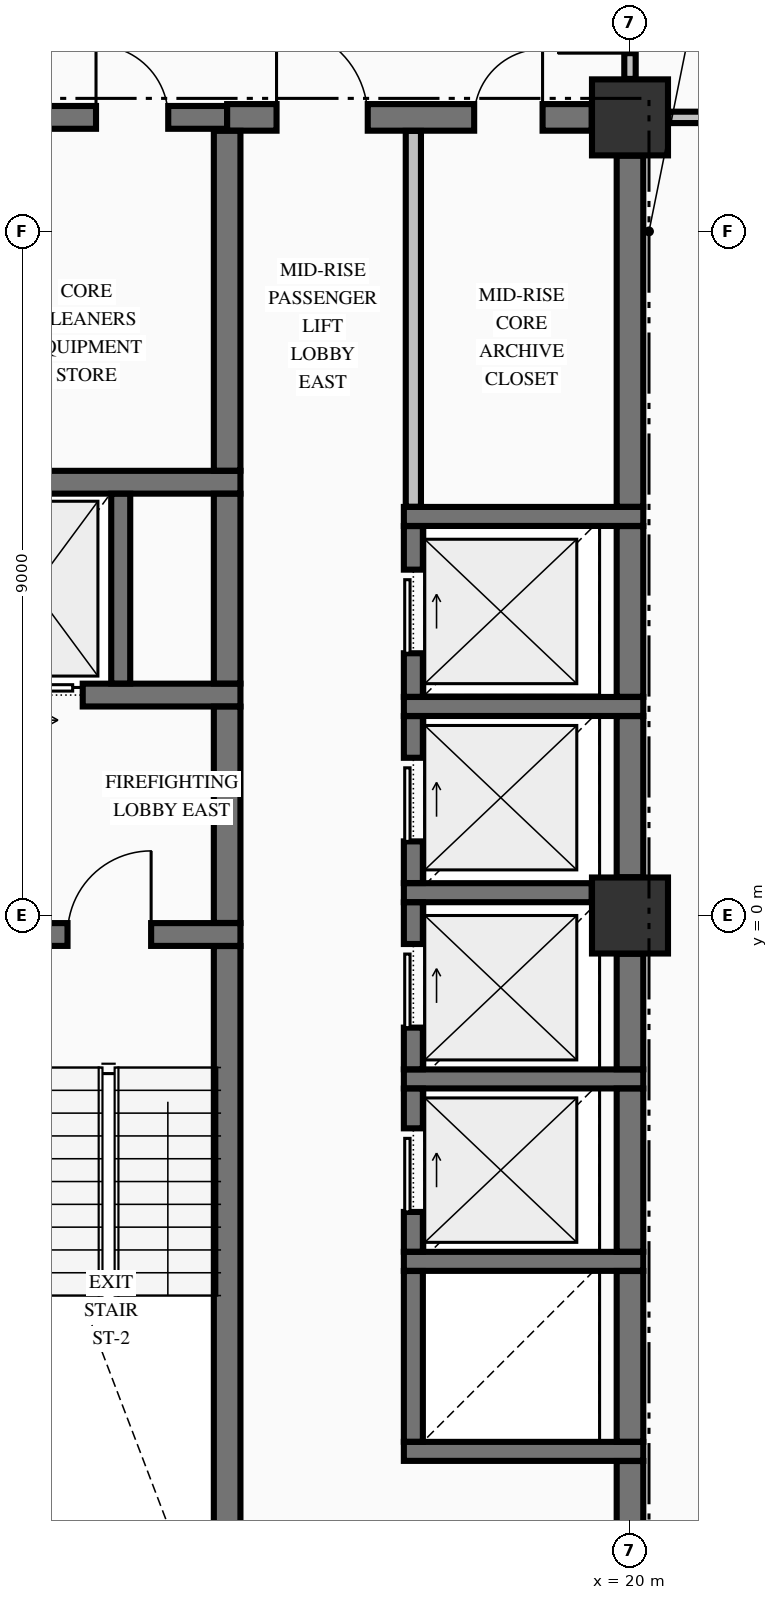
"""IFC4 building model, lengths in metres.
Left out: names, types, materials, properties, quantities, classifications, styles, units other than length and angle.
Written with IfcOpenShell. Run it as: python <this file> out.ifc"""

import sys

from ifc_helpers import new_model, si_unit, direction, frame, frame_2d, origin, origin_2d, place, context, subcontext, project, spatial, rectangle, extrude, element, fill, save


model = new_model("IFC4")
c1 = context("Model", 3, precision=1e-05, world=origin(), true_north=direction((0.0, 1.0)))
c2 = subcontext(c1, "Body", "Model", "MODEL_VIEW")
j1 = project(units=[si_unit("LENGTHUNIT", "METRE"), si_unit("PLANEANGLEUNIT", "RADIAN")], contexts=[c1])
p1 = place(None, origin())
s1 = spatial("IfcSite", under=j1, at=p1, CompositionType="ELEMENT")
p2 = place(p1, origin())
s2 = spatial("IfcBuilding", under=s1, at=p2, CompositionType="ELEMENT")
p3 = place(p2, frame((0.0, 0.0, 105.64)))
s3 = spatial("IfcBuildingStorey", under=s2, at=p3, CompositionType="ELEMENT", Elevation=105.64)
for number, where, z_axis, x_axis in (
    (1, (20.0, 10.5, -0.25), (0.0, 0.0, 1.0), (1.0, 0.0, 0.0)),
    (2, (20.0, 0.0, -0.25), (0.0, 0.0, 1.0), (1.0, 0.0, 0.0)),
):
    element("IfcColumn", number, at=place(p3, frame(where, z_axis=z_axis, x_axis=x_axis)), inside=s3, PredefinedType="COLUMN", context=c2, shape_type="SweptSolid", body=[
        extrude(rectangle(XDim=1.0, YDim=1.0, at=origin_2d()), origin(), (0.0, 0.0, 1.0), 3.57),
    ])
for number, where, z_axis, x_axis in (
    (3, (17.025, -7.05, 0.0), (0.0, 0.0, 1.0), (1.0, 0.0, 0.0)),
    (4, (17.025, -4.55, 0.0), (0.0, 0.0, 1.0), (1.0, 0.0, 0.0)),
    (5, (17.025, -2.15, 0.0), (0.0, 0.0, 1.0), (1.0, 0.0, 0.0)),
):
    element("IfcWall", number, at=place(p3, frame(where, z_axis=z_axis, x_axis=x_axis)), inside=s3, PredefinedType="SOLIDWALL", context=c2, shape_type="SweptSolid", body=[
        extrude(rectangle(XDim=3.15, YDim=0.25, at=frame_2d((1.575, 0.0))), origin(), (0.0, 0.0, 1.0), 3.32),
    ])
p4 = place(p3, frame((11.504, -0.25, 0.0), z_axis=(0.0, 0.0, 1.0), x_axis=(1.0, 0.0, 0.0)))
e6 = element("IfcWall", 6, at=p4, inside=s3, PredefinedType="SHEAR", context=c2, shape_type="SweptSolid", body=[
    extrude(rectangle(XDim=3.371, YDim=0.3, at=frame_2d((1.686, 0.0))), origin(), (0.0, 0.0, 1.0), 3.32),
])
p5 = place(p4, frame((1.096, 0.0, 0.0)))
e7 = element("IfcOpeningElement", 7, at=p5, cuts=e6, PredefinedType="OPENING", context=c2, shape_type="SweptSolid", body=[
    extrude(rectangle(XDim=1.1, YDim=2.15, at=frame_2d((0.55, 1.075))), frame((0.0, 0.16, 0.0), z_axis=(0.0, -1.0, 0.0), x_axis=(1.0, 0.0, 0.0)), (0.0, 0.0, 1.0), 0.32),
])
p6 = place(p3, frame((17.025, 0.3, 0.0), z_axis=(0.0, 0.0, 1.0), x_axis=(1.0, 0.0, 0.0)))
e8 = element("IfcWall", 8, at=p6, inside=s3, PredefinedType="SOLIDWALL", context=c2, shape_type="SweptSolid", body=[
    extrude(rectangle(XDim=2.471, YDim=0.25, at=frame_2d((1.236, 0.0))), origin(), (0.0, 0.0, 1.0), 3.32),
])
p7 = place(p3, frame((17.025, 2.75, 0.0), z_axis=(0.0, 0.0, 1.0), x_axis=(1.0, 0.0, 0.0)))
e9 = element("IfcWall", 9, at=p7, inside=s3, PredefinedType="SOLIDWALL", context=c2, shape_type="SweptSolid", body=[
    extrude(rectangle(XDim=3.15, YDim=0.25, at=frame_2d((1.575, 0.0))), origin(), (0.0, 0.0, 1.0), 3.32),
])
p8 = place(p3, frame((10.85, 2.9, 0.0), z_axis=(0.0, 0.0, 1.0), x_axis=(1.0, 0.0, 0.0)))
e10 = element("IfcWall", 10, at=p8, inside=s3, PredefinedType="SHEAR", context=c2, shape_type="SweptSolid", body=[
    extrude(rectangle(XDim=4.025, YDim=0.3, at=frame_2d((2.012, 0.0))), origin(), (0.0, 0.0, 1.0), 3.32),
])
p9 = place(p8, frame((0.85, 0.0, 0.0)))
e11 = element("IfcOpeningElement", 11, at=p9, cuts=e10, PredefinedType="OPENING", context=c2, shape_type="SweptSolid", body=[
    extrude(rectangle(XDim=1.1, YDim=2.2, at=frame_2d((0.55, 1.1))), frame((0.0, 0.16, 0.0), z_axis=(0.0, -1.0, 0.0), x_axis=(1.0, 0.0, 0.0)), (0.0, 0.0, 1.0), 0.32),
])
p10 = place(p3, frame((17.025, 5.25, 0.0), z_axis=(0.0, 0.0, 1.0), x_axis=(1.0, 0.0, 0.0)))
e12 = element("IfcWall", 12, at=p10, inside=s3, PredefinedType="SOLIDWALL", context=c2, shape_type="SweptSolid", body=[
    extrude(rectangle(XDim=3.15, YDim=0.25, at=frame_2d((1.575, 0.0))), origin(), (0.0, 0.0, 1.0), 3.32),
])
p11 = place(p3, frame((10.85, 5.7, 0.0), z_axis=(0.0, 0.0, 1.0), x_axis=(1.0, 0.0, 0.0)))
e13 = element("IfcWall", 13, at=p11, inside=s3, PredefinedType="SHEAR", context=c2, shape_type="SweptSolid", body=[
    extrude(rectangle(XDim=4.025, YDim=0.3, at=frame_2d((2.012, 0.0))), origin(), (0.0, 0.0, 1.0), 3.32),
])
p12 = place(p3, frame((11.504, 10.5, 0.0), z_axis=(0.0, 0.0, 1.0), x_axis=(1.0, 0.0, 0.0)))
e14 = element("IfcWall", 14, at=p12, inside=s3, PredefinedType="SHEAR", context=c2, shape_type="SweptSolid", body=[
    extrude(rectangle(XDim=3.196, YDim=0.3, at=frame_2d((1.598, 0.0))), origin(), (0.0, 0.0, 1.0), 3.32),
])
p13 = place(p12, frame((1.471, 0.0, 0.0)))
e15 = element("IfcOpeningElement", 15, at=p13, cuts=e14, PredefinedType="OPENING", context=c2, shape_type="SweptSolid", body=[
    extrude(rectangle(XDim=0.95, YDim=2.15, at=frame_2d((0.475, 1.075))), frame((0.0, 0.16, 0.0), z_axis=(0.0, -1.0, 0.0), x_axis=(1.0, 0.0, 0.0)), (0.0, 0.0, 1.0), 0.32),
])
p14 = place(p3, frame((14.7, 10.5, 0.0), z_axis=(0.0, 0.0, 1.0), x_axis=(1.0, 0.0, 0.0)))
e16 = element("IfcWall", 16, at=p14, inside=s3, PredefinedType="SHEAR", context=c2, shape_type="SweptSolid", body=[
    extrude(rectangle(XDim=4.796, YDim=0.35, at=frame_2d((2.398, 0.0))), origin(), (0.0, 0.0, 1.0), 3.32),
])
p15 = place(p14, frame((0.65, 0.0, 0.0)))
e17 = element("IfcOpeningElement", 17, at=p15, cuts=e16, PredefinedType="OPENING", context=c2, shape_type="SweptSolid", body=[
    extrude(rectangle(XDim=1.2, YDim=2.15, at=frame_2d((0.6, 1.075))), frame((0.0, 0.185, 0.0), z_axis=(0.0, -1.0, 0.0), x_axis=(1.0, 0.0, 0.0)), (0.0, 0.0, 1.0), 0.37),
])
p16 = place(p14, frame((3.25, 0.0, 0.0)))
e18 = element("IfcOpeningElement", 18, at=p16, cuts=e16, PredefinedType="OPENING", context=c2, shape_type="SweptSolid", body=[
    extrude(rectangle(XDim=0.9, YDim=2.15, at=frame_2d((0.45, 1.075))), frame((0.0, 0.185, 0.0), z_axis=(0.0, -1.0, 0.0), x_axis=(1.0, 0.0, 0.0)), (0.0, 0.0, 1.0), 0.37),
])
p17 = place(p3, frame((20.506, 10.5, 0.0), z_axis=(0.0, 0.0, 1.0), x_axis=(1.0, 0.0, 0.0)))
e19 = element("IfcWall", 19, at=p17, inside=s3, PredefinedType="PARTITIONING", context=c2, shape_type="SweptSolid", body=[
    extrude(rectangle(XDim=7.329, YDim=0.15, at=frame_2d((3.665, 0.0))), origin(), (0.0, 0.0, 1.0), 3.32),
])
p18 = place(p17, frame((2.994, 0.0, 0.0)))
e20 = element("IfcOpeningElement", 20, at=p18, cuts=e19, PredefinedType="OPENING", context=c2, shape_type="SweptSolid", body=[
    extrude(rectangle(XDim=1.0, YDim=2.15, at=frame_2d((0.5, 1.075))), frame((0.0, 0.085, 0.0), z_axis=(0.0, -1.0, 0.0), x_axis=(1.0, 0.0, 0.0)), (0.0, 0.0, 1.0), 0.17),
])
p19 = place(p3, frame((13.3, 3.052, 0.0), z_axis=(0.0, 0.0, 1.0), x_axis=(0.0, 1.0, 0.0)))
e21 = element("IfcWall", 21, at=p19, inside=s3, PredefinedType="SOLIDWALL", context=c2, shape_type="SweptSolid", body=[
    extrude(rectangle(XDim=2.496, YDim=0.25, at=frame_2d((1.248, 0.0))), origin(), (0.0, 0.0, 1.0), 3.32),
])
p20 = place(p3, frame((14.7, -9.773, 0.0), z_axis=(0.0, 0.0, 1.0), x_axis=(0.0, 1.0, 0.0)))
e22 = element("IfcWall", 22, at=p20, inside=s3, PredefinedType="SHEAR", context=c2, shape_type="SweptSolid", body=[
    extrude(rectangle(XDim=9.371, YDim=0.35, at=frame_2d((4.686, 0.0))), origin(), (0.0, 0.0, 1.0), 3.32),
])
p21 = place(p3, frame((14.7, -0.098, 0.0), z_axis=(0.0, 0.0, 1.0), x_axis=(0.0, 1.0, 0.0)))
e23 = element("IfcWall", 23, at=p21, inside=s3, PredefinedType="SHEAR", context=c2, shape_type="SweptSolid", body=[
    extrude(rectangle(XDim=2.846, YDim=0.35, at=frame_2d((1.423, 0.0))), origin(), (0.0, 0.0, 1.0), 3.32),
])
p22 = place(p3, frame((14.7, 3.052, 0.0), z_axis=(0.0, 0.0, 1.0), x_axis=(0.0, 1.0, 0.0)))
e24 = element("IfcWall", 24, at=p22, inside=s3, PredefinedType="SHEAR", context=c2, shape_type="SweptSolid", body=[
    extrude(rectangle(XDim=2.496, YDim=0.35, at=frame_2d((1.248, 0.0))), origin(), (0.0, 0.0, 1.0), 3.32),
])
p23 = place(p3, frame((14.7, 5.852, 0.0), z_axis=(0.0, 0.0, 1.0), x_axis=(0.0, 1.0, 0.0)))
e25 = element("IfcWall", 25, at=p23, inside=s3, PredefinedType="SHEAR", context=c2, shape_type="SweptSolid", body=[
    extrude(rectangle(XDim=4.471, YDim=0.35, at=frame_2d((2.235, 0.0))), origin(), (0.0, 0.0, 1.0), 3.32),
])
p24 = place(p3, frame((17.15, -6.923, 0.0), z_axis=(0.0, 0.0, 1.0), x_axis=(0.0, 1.0, 0.0)))
e26 = element("IfcWall", 26, at=p24, inside=s3, PredefinedType="SOLIDWALL", context=c2, shape_type="SweptSolid", body=[
    extrude(rectangle(XDim=2.246, YDim=0.25, at=frame_2d((1.123, 0.0))), origin(), (0.0, 0.0, 1.0), 3.32),
])
p25 = place(p3, frame((17.15, -4.423, 0.0), z_axis=(0.0, 0.0, 1.0), x_axis=(0.0, 1.0, 0.0)))
e27 = element("IfcWall", 27, at=p25, inside=s3, PredefinedType="SOLIDWALL", context=c2, shape_type="SweptSolid", body=[
    extrude(rectangle(XDim=2.146, YDim=0.25, at=frame_2d((1.073, 0.0))), origin(), (0.0, 0.0, 1.0), 3.32),
])
p26 = place(p25, frame((0.523, 0.0, 0.0)))
e28 = element("IfcOpeningElement", 28, at=p26, cuts=e27, PredefinedType="OPENING", context=c2, shape_type="SweptSolid", body=[
    extrude(rectangle(XDim=1.1, YDim=2.2, at=frame_2d((0.55, 1.1))), frame((0.0, 0.135, 0.0), z_axis=(0.0, -1.0, 0.0), x_axis=(1.0, 0.0, 0.0)), (0.0, 0.0, 1.0), 0.27),
])
p27 = place(p3, frame((17.15, -2.023, 0.0), z_axis=(0.0, 0.0, 1.0), x_axis=(0.0, 1.0, 0.0)))
e29 = element("IfcWall", 29, at=p27, inside=s3, PredefinedType="SOLIDWALL", context=c2, shape_type="SweptSolid", body=[
    extrude(rectangle(XDim=2.196, YDim=0.25, at=frame_2d((1.098, 0.0))), origin(), (0.0, 0.0, 1.0), 3.32),
])
p28 = place(p27, frame((0.548, 0.0, 0.0)))
e30 = element("IfcOpeningElement", 30, at=p28, cuts=e29, PredefinedType="OPENING", context=c2, shape_type="SweptSolid", body=[
    extrude(rectangle(XDim=1.1, YDim=2.2, at=frame_2d((0.55, 1.1))), frame((0.0, 0.135, 0.0), z_axis=(0.0, -1.0, 0.0), x_axis=(1.0, 0.0, 0.0)), (0.0, 0.0, 1.0), 0.27),
])
p29 = place(p3, frame((17.15, 0.427, 0.0), z_axis=(0.0, 0.0, 1.0), x_axis=(0.0, 1.0, 0.0)))
e31 = element("IfcWall", 31, at=p29, inside=s3, PredefinedType="SOLIDWALL", context=c2, shape_type="SweptSolid", body=[
    extrude(rectangle(XDim=2.196, YDim=0.25, at=frame_2d((1.098, 0.0))), origin(), (0.0, 0.0, 1.0), 3.32),
])
p30 = place(p29, frame((0.548, 0.0, 0.0)))
e32 = element("IfcOpeningElement", 32, at=p30, cuts=e31, PredefinedType="OPENING", context=c2, shape_type="SweptSolid", body=[
    extrude(rectangle(XDim=1.1, YDim=2.2, at=frame_2d((0.55, 1.1))), frame((0.0, 0.135, 0.0), z_axis=(0.0, -1.0, 0.0), x_axis=(1.0, 0.0, 0.0)), (0.0, 0.0, 1.0), 0.27),
])
p31 = place(p3, frame((17.15, 2.877, 0.0), z_axis=(0.0, 0.0, 1.0), x_axis=(0.0, 1.0, 0.0)))
e33 = element("IfcWall", 33, at=p31, inside=s3, PredefinedType="SOLIDWALL", context=c2, shape_type="SweptSolid", body=[
    extrude(rectangle(XDim=2.246, YDim=0.25, at=frame_2d((1.123, 0.0))), origin(), (0.0, 0.0, 1.0), 3.32),
])
p32 = place(p31, frame((0.573, 0.0, 0.0)))
e34 = element("IfcOpeningElement", 34, at=p32, cuts=e33, PredefinedType="OPENING", context=c2, shape_type="SweptSolid", body=[
    extrude(rectangle(XDim=1.1, YDim=2.2, at=frame_2d((0.55, 1.1))), frame((0.0, 0.135, 0.0), z_axis=(0.0, -1.0, 0.0), x_axis=(1.0, 0.0, 0.0)), (0.0, 0.0, 1.0), 0.27),
])
p33 = place(p3, frame((20.0, -9.446, 0.0), z_axis=(0.0, 0.0, 1.0), x_axis=(0.0, 1.0, 0.0)))
e35 = element("IfcWall", 35, at=p33, inside=s3, PredefinedType="SHEAR", context=c2, shape_type="SweptSolid", body=[
    extrude(rectangle(XDim=2.269, YDim=0.35, at=frame_2d((1.135, 0.0))), origin(), (0.0, 0.0, 1.0), 3.32),
])
p34 = place(p3, frame((20.0, -6.923, 0.0), z_axis=(0.0, 0.0, 1.0), x_axis=(0.0, 1.0, 0.0)))
e36 = element("IfcWall", 36, at=p34, inside=s3, PredefinedType="SHEAR", context=c2, shape_type="SweptSolid", body=[
    extrude(rectangle(XDim=2.246, YDim=0.35, at=frame_2d((1.123, 0.0))), origin(), (0.0, 0.0, 1.0), 3.32),
])
p35 = place(p3, frame((20.0, -4.423, 0.0), z_axis=(0.0, 0.0, 1.0), x_axis=(0.0, 1.0, 0.0)))
e37 = element("IfcWall", 37, at=p35, inside=s3, PredefinedType="SHEAR", context=c2, shape_type="SweptSolid", body=[
    extrude(rectangle(XDim=2.146, YDim=0.35, at=frame_2d((1.073, 0.0))), origin(), (0.0, 0.0, 1.0), 3.32),
])
p36 = place(p3, frame((20.0, -2.023, 0.0), z_axis=(0.0, 0.0, 1.0), x_axis=(0.0, 1.0, 0.0)))
e38 = element("IfcWall", 38, at=p36, inside=s3, PredefinedType="SHEAR", context=c2, shape_type="SweptSolid", body=[
    extrude(rectangle(XDim=1.519, YDim=0.35, at=frame_2d((0.76, 0.0))), origin(), (0.0, 0.0, 1.0), 3.32),
])
p37 = place(p3, frame((20.0, 0.504, 0.0), z_axis=(0.0, 0.0, 1.0), x_axis=(0.0, 1.0, 0.0)))
e39 = element("IfcWall", 39, at=p37, inside=s3, PredefinedType="SHEAR", context=c2, shape_type="SweptSolid", body=[
    extrude(rectangle(XDim=2.119, YDim=0.35, at=frame_2d((1.06, 0.0))), origin(), (0.0, 0.0, 1.0), 3.32),
])
p38 = place(p3, frame((20.0, 2.877, 0.0), z_axis=(0.0, 0.0, 1.0), x_axis=(0.0, 1.0, 0.0)))
e40 = element("IfcWall", 40, at=p38, inside=s3, PredefinedType="SHEAR", context=c2, shape_type="SweptSolid", body=[
    extrude(rectangle(XDim=2.246, YDim=0.35, at=frame_2d((1.123, 0.0))), origin(), (0.0, 0.0, 1.0), 3.32),
])
p39 = place(p3, frame((20.0, 5.377, 0.0), z_axis=(0.0, 0.0, 1.0), x_axis=(0.0, 1.0, 0.0)))
e41 = element("IfcWall", 41, at=p39, inside=s3, PredefinedType="SHEAR", context=c2, shape_type="SweptSolid", body=[
    extrude(rectangle(XDim=4.619, YDim=0.35, at=frame_2d((2.31, 0.0))), origin(), (0.0, 0.0, 1.0), 3.32),
])
p40 = place(p3, frame((17.15, 5.378, 0.0), z_axis=(0.0, 0.0, 1.0), x_axis=(0.0, 1.0, 0.0)))
e42 = element("IfcWall", 42, at=p40, inside=s3, PredefinedType="PARTITIONING", context=c2, shape_type="SweptSolid", body=[
    extrude(rectangle(XDim=4.944, YDim=0.2, at=frame_2d((2.472, 0.0))), origin(), (0.0, 0.0, 1.0), 3.32),
])
p41 = place(p3, frame((20.0, 11.006, 0.0), z_axis=(0.0, 0.0, 1.0), x_axis=(0.0, 1.0, 0.0)))
e43 = element("IfcWall", 43, at=p41, inside=s3, PredefinedType="PARTITIONING", context=c2, shape_type="SweptSolid", body=[
    extrude(rectangle(XDim=2.066, YDim=0.15, at=frame_2d((1.033, 0.0))), origin(), (0.0, 0.0, 1.0), 2.81),
])
p42 = place(p41, frame((0.339, 0.0, 0.0)))
e44 = element("IfcOpeningElement", 44, at=p42, cuts=e43, PredefinedType="OPENING", context=c2, shape_type="SweptSolid", body=[
    extrude(rectangle(XDim=0.95, YDim=2.15, at=frame_2d((0.475, 1.075))), frame((0.0, 0.085, 0.0), z_axis=(0.0, -1.0, 0.0), x_axis=(1.0, 0.0, 0.0)), (0.0, 0.0, 1.0), 0.17),
])
p43 = place(p5, origin())
e45 = element("IfcDoor", 45, at=p43, inside=s3, OperationType="SINGLE_SWING_RIGHT", PredefinedType="DOOR", context=c2, shape_type="SweptSolid", body=[
    extrude(rectangle(XDim=1.1, YDim=2.15, at=frame_2d((0.55, 1.075))), frame((0.0, 0.025, 0.0), z_axis=(0.0, -1.0, 0.0), x_axis=(1.0, 0.0, 0.0)), (0.0, 0.0, 1.0), 0.05),
])
fill(e7, e45)
p44 = place(p9, origin())
e46 = element("IfcDoor", 46, at=p44, inside=s3, OperationType="SLIDING_TO_RIGHT", PredefinedType="DOOR", context=c2, shape_type="SweptSolid", body=[
    extrude(rectangle(XDim=1.1, YDim=2.2, at=frame_2d((0.55, 1.1))), frame((0.0, 0.025, 0.0), z_axis=(0.0, -1.0, 0.0), x_axis=(1.0, 0.0, 0.0)), (0.0, 0.0, 1.0), 0.05),
])
fill(e11, e46)
p45 = place(p13, origin())
e47 = element("IfcDoor", 47, at=p45, inside=s3, OperationType="SINGLE_SWING_LEFT", PredefinedType="DOOR", context=c2, shape_type="SweptSolid", body=[
    extrude(rectangle(XDim=0.95, YDim=2.15, at=frame_2d((0.475, 1.075))), frame((0.0, 0.025, 0.0), z_axis=(0.0, -1.0, 0.0), x_axis=(1.0, 0.0, 0.0)), (0.0, 0.0, 1.0), 0.05),
])
fill(e15, e47)
p46 = place(p26, origin())
e48 = element("IfcDoor", 48, at=p46, inside=s3, OperationType="SLIDING_TO_RIGHT", PredefinedType="DOOR", context=c2, shape_type="SweptSolid", body=[
    extrude(rectangle(XDim=1.1, YDim=2.2, at=frame_2d((0.55, 1.1))), frame((0.0, 0.025, 0.0), z_axis=(0.0, -1.0, 0.0), x_axis=(1.0, 0.0, 0.0)), (0.0, 0.0, 1.0), 0.05),
])
fill(e28, e48)
p47 = place(p28, origin())
e49 = element("IfcDoor", 49, at=p47, inside=s3, OperationType="SLIDING_TO_RIGHT", PredefinedType="DOOR", context=c2, shape_type="SweptSolid", body=[
    extrude(rectangle(XDim=1.1, YDim=2.2, at=frame_2d((0.55, 1.1))), frame((0.0, 0.025, 0.0), z_axis=(0.0, -1.0, 0.0), x_axis=(1.0, 0.0, 0.0)), (0.0, 0.0, 1.0), 0.05),
])
fill(e30, e49)
p48 = place(p30, origin())
e50 = element("IfcDoor", 50, at=p48, inside=s3, OperationType="SLIDING_TO_RIGHT", PredefinedType="DOOR", context=c2, shape_type="SweptSolid", body=[
    extrude(rectangle(XDim=1.1, YDim=2.2, at=frame_2d((0.55, 1.1))), frame((0.0, 0.025, 0.0), z_axis=(0.0, -1.0, 0.0), x_axis=(1.0, 0.0, 0.0)), (0.0, 0.0, 1.0), 0.05),
])
fill(e32, e50)
p49 = place(p32, origin())
e51 = element("IfcDoor", 51, at=p49, inside=s3, OperationType="SLIDING_TO_RIGHT", PredefinedType="DOOR", context=c2, shape_type="SweptSolid", body=[
    extrude(rectangle(XDim=1.1, YDim=2.2, at=frame_2d((0.55, 1.1))), frame((0.0, 0.025, 0.0), z_axis=(0.0, -1.0, 0.0), x_axis=(1.0, 0.0, 0.0)), (0.0, 0.0, 1.0), 0.05),
])
fill(e34, e51)
p50 = place(p15, origin())
e52 = element("IfcDoor", 52, at=p50, inside=s3, OperationType="SINGLE_SWING_LEFT", PredefinedType="DOOR", context=c2, shape_type="SweptSolid", body=[
    extrude(rectangle(XDim=1.2, YDim=2.15, at=frame_2d((0.6, 1.075))), frame((0.0, 0.025, 0.0), z_axis=(0.0, -1.0, 0.0), x_axis=(1.0, 0.0, 0.0)), (0.0, 0.0, 1.0), 0.05),
])
fill(e17, e52)
p51 = place(p16, origin())
e53 = element("IfcDoor", 53, at=p51, inside=s3, OperationType="SINGLE_SWING_RIGHT", PredefinedType="DOOR", context=c2, shape_type="SweptSolid", body=[
    extrude(rectangle(XDim=0.9, YDim=2.15, at=frame_2d((0.45, 1.075))), frame((0.0, 0.025, 0.0), z_axis=(0.0, -1.0, 0.0), x_axis=(1.0, 0.0, 0.0)), (0.0, 0.0, 1.0), 0.05),
])
fill(e18, e53)
p52 = place(p42, origin())
e54 = element("IfcDoor", 54, at=p52, inside=s3, OperationType="SINGLE_SWING_LEFT", PredefinedType="DOOR", context=c2, shape_type="SweptSolid", body=[
    extrude(rectangle(XDim=0.95, YDim=2.15, at=frame_2d((0.475, 1.075))), frame((0.0, 0.025, 0.0), z_axis=(0.0, -1.0, 0.0), x_axis=(1.0, 0.0, 0.0)), (0.0, 0.0, 1.0), 0.05),
])
fill(e44, e54)
save(model, sys.argv[1])
